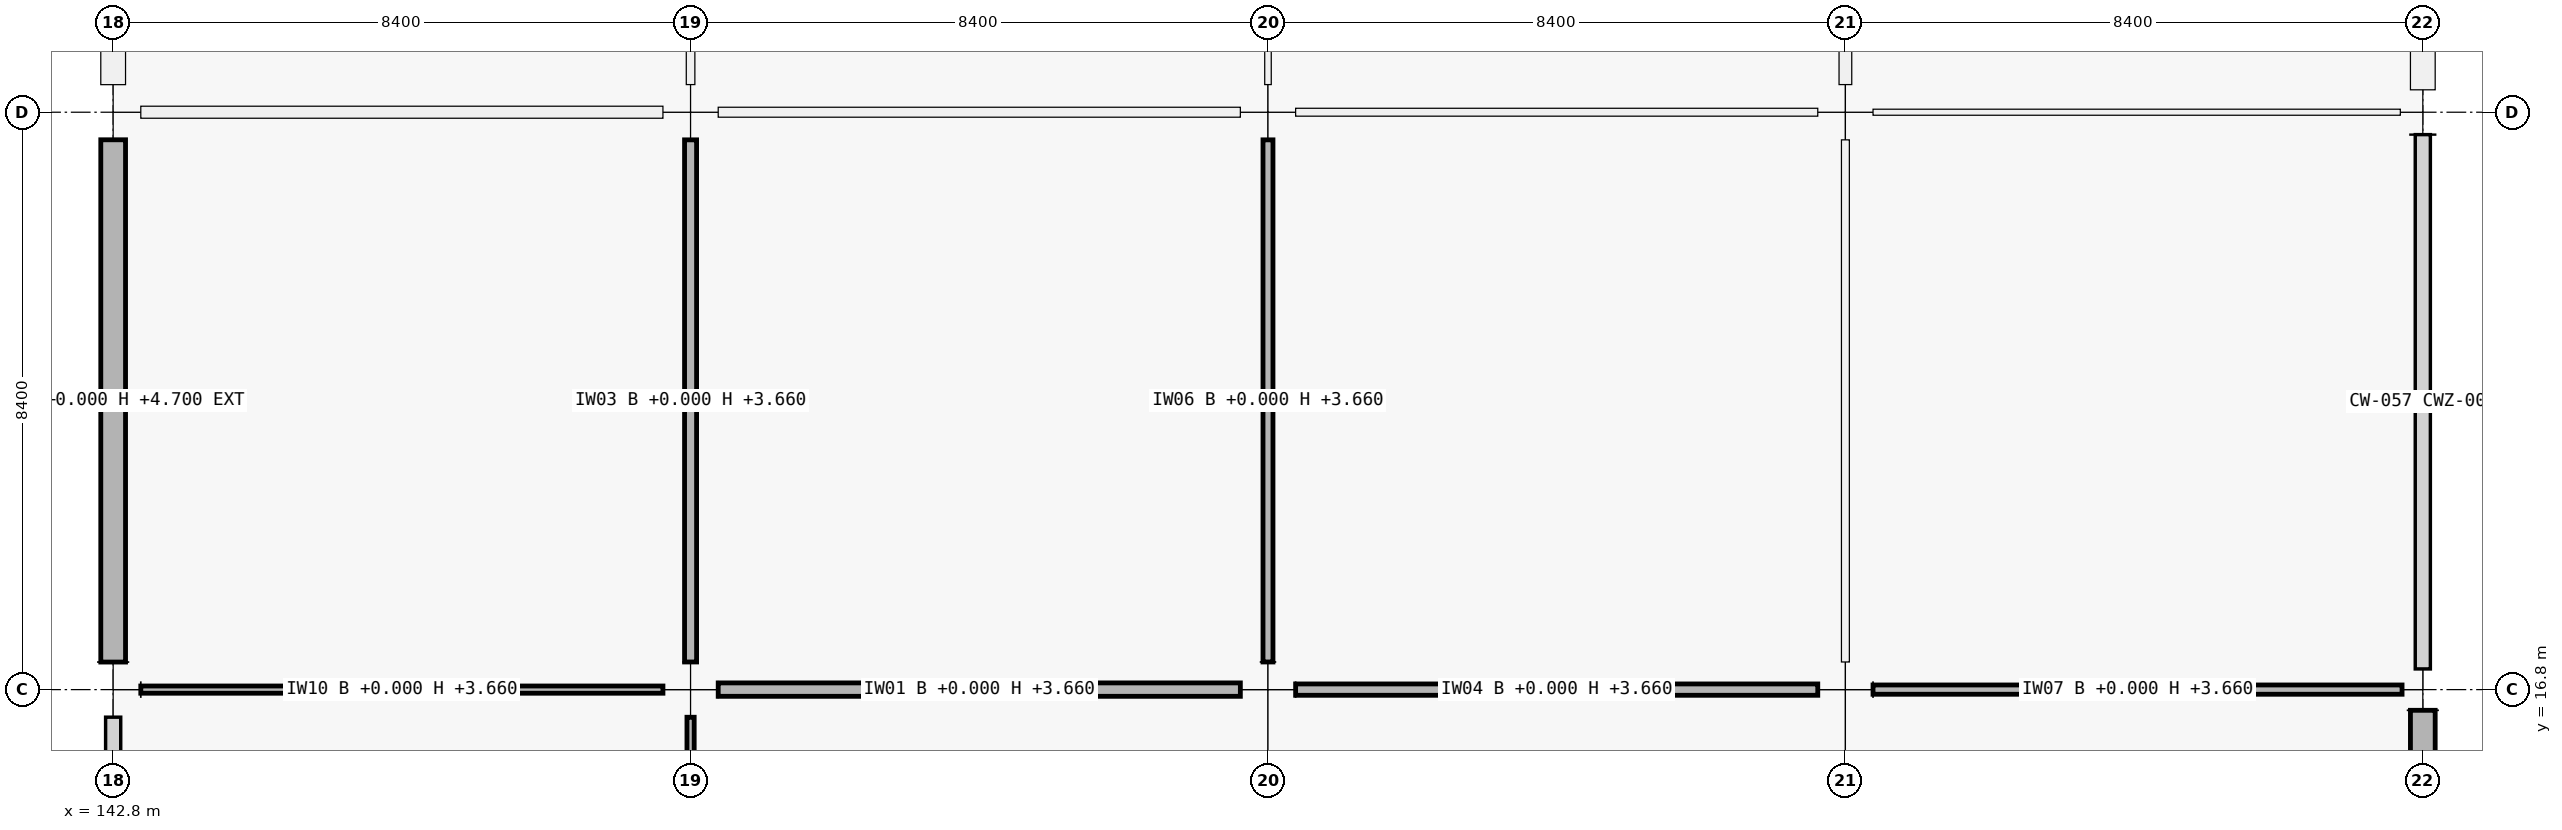
"""IFC4 building model, lengths in metres.
Left out: names, types, materials, properties, quantities, classifications, styles, units other than length and angle.
Written with IfcOpenShell. Run it as: python <this file> out.ifc"""

import sys

from ifc_helpers import new_model, si_unit, direction, frame, frame_2d, origin, origin_2d, place, context, subcontext, project, spatial, rectangle, extrude, element, fill, save


model = new_model("IFC4")
c1 = context("Model", 3, precision=1e-05, world=origin(), true_north=direction((0.0, 1.0)))
c2 = subcontext(c1, "Body", "Model", "MODEL_VIEW")
j1 = project(units=[si_unit("LENGTHUNIT", "METRE"), si_unit("PLANEANGLEUNIT", "RADIAN")], contexts=[c1])
p1 = place(None, origin())
s1 = spatial("IfcSite", under=j1, at=p1, CompositionType="ELEMENT")
p2 = place(p1, origin())
s2 = spatial("IfcBuilding", under=s1, at=p2, CompositionType="ELEMENT")
p3 = place(p2, origin())
s3 = spatial("IfcBuildingStorey", under=s2, at=p3, CompositionType="ELEMENT", Elevation=0.0)
for number, where, z_axis, x_axis in (
    (1, (142.8, 16.8, 0.0), (0.0, 0.0, 1.0), (1.0, 0.0, 0.0)),
    (2, (142.8, 25.2, 0.0), (0.0, 0.0, 1.0), (1.0, 0.0, 0.0)),
    (3, (151.2, 16.8, 0.0), (0.0, 0.0, 1.0), (1.0, 0.0, 0.0)),
    (4, (151.2, 25.2, 0.0), (0.0, 0.0, 1.0), (1.0, 0.0, 0.0)),
    (5, (159.6, 16.8, 0.0), (0.0, 0.0, 1.0), (1.0, 0.0, 0.0)),
    (6, (159.6, 25.2, 0.0), (0.0, 0.0, 1.0), (1.0, 0.0, 0.0)),
    (7, (168.0, 16.8, 0.0), (0.0, 0.0, 1.0), (1.0, 0.0, 0.0)),
    (8, (168.0, 25.2, 0.0), (0.0, 0.0, 1.0), (1.0, 0.0, 0.0)),
):
    element("IfcColumn", number, at=place(p3, frame(where, z_axis=z_axis, x_axis=x_axis)), inside=s3, PredefinedType="COLUMN", context=c2, shape_type="SweptSolid", body=[
        extrude(rectangle(XDim=0.8, YDim=0.8, at=origin_2d()), origin(), (0.0, 0.0, 1.0), 5.76),
    ])
p4 = place(p3, frame((176.4, 16.8, 0.0), z_axis=(0.0, 0.0, 1.0), x_axis=(1.0, 0.0, 0.0)))
e9 = element("IfcColumn", 9, at=p4, inside=s3, PredefinedType="COLUMN", context=c2, shape_type="SweptSolid", body=[
    extrude(rectangle(XDim=0.6, YDim=0.6, at=origin_2d()), origin(), (0.0, 0.0, 1.0), 5.76),
])
p5 = place(p3, frame((176.4, 25.2, 0.0), z_axis=(0.0, 0.0, 1.0), x_axis=(1.0, 0.0, 0.0)))
e10 = element("IfcColumn", 10, at=p5, inside=s3, PredefinedType="COLUMN", context=c2, shape_type="SweptSolid", body=[
    extrude(rectangle(XDim=0.65, YDim=0.65, at=origin_2d()), origin(), (0.0, 0.0, 1.0), 5.76),
])
p6 = place(p3, frame((142.8, 17.201, 0.0), z_axis=(0.0, 0.0, 1.0), x_axis=(0.0, 1.0, 0.0)))
e11 = element("IfcWall", 11, at=p6, inside=s3, PredefinedType="SOLIDWALL", context=c2, shape_type="SweptSolid", body=[
    extrude(rectangle(XDim=7.598, YDim=0.36, at=frame_2d((3.799, 0.0))), origin(), (0.0, 0.0, 1.0), 4.7),
])
p7 = place(p6, frame((3.024, 0.0, 0.9)))
e12 = element("IfcOpeningElement", 12, at=p7, cuts=e11, PredefinedType="OPENING", context=c2, shape_type="SweptSolid", body=[
    extrude(rectangle(XDim=1.55, YDim=1.6, at=frame_2d((0.775, 0.8))), frame((0.0, 0.18, 0.0), z_axis=(0.0, -1.0, 0.0), x_axis=(1.0, 0.0, 0.0)), (0.0, 0.0, 1.0), 0.36),
])
p8 = place(p3, frame((142.8, 25.601, 0.0), z_axis=(0.0, 0.0, 1.0), x_axis=(0.0, 1.0, 0.0)))
e13 = element("IfcWall", 13, at=p8, inside=s3, PredefinedType="SOLIDWALL", context=c2, shape_type="SweptSolid", body=[
    extrude(rectangle(XDim=7.598, YDim=0.36, at=frame_2d((3.799, 0.0))), origin(), (0.0, 0.0, 1.0), 4.7),
])
p9 = place(p8, frame((2.774, 0.0, 0.9)))
e14 = element("IfcOpeningElement", 14, at=p9, cuts=e13, PredefinedType="OPENING", context=c2, shape_type="SweptSolid", body=[
    extrude(rectangle(XDim=2.05, YDim=1.45, at=frame_2d((1.025, 0.725))), frame((0.0, 0.18, 0.0), z_axis=(0.0, -1.0, 0.0), x_axis=(1.0, 0.0, 0.0)), (0.0, 0.0, 1.0), 0.36),
])
p10 = place(p3, frame((176.4, 16.499, 0.0), z_axis=(0.0, 0.0, 1.0), x_axis=(0.0, -1.0, 0.0)))
e15 = element("IfcWall", 15, at=p10, inside=s3, PredefinedType="SOLIDWALL", context=c2, shape_type="SweptSolid", body=[
    extrude(rectangle(XDim=7.773, YDim=0.36, at=frame_2d((3.886, 0.0))), origin(), (0.0, 0.0, 1.0), 4.7),
])
p11 = place(p10, frame((2.886, 0.0, 0.9)))
e16 = element("IfcOpeningElement", 16, at=p11, cuts=e15, PredefinedType="OPENING", context=c2, shape_type="SweptSolid", body=[
    extrude(rectangle(XDim=2.0, YDim=2.1, at=frame_2d((1.0, 1.05))), frame((0.0, 0.18, 0.0), z_axis=(0.0, -1.0, 0.0), x_axis=(1.0, 0.0, 0.0)), (0.0, 0.0, 1.0), 0.36),
])
p12 = place(p3, frame((176.4, 33.299, 0.0), z_axis=(0.0, 0.0, 1.0), x_axis=(0.0, -1.0, 0.0)))
e17 = element("IfcWall", 17, at=p12, inside=s3, PredefinedType="SOLIDWALL", context=c2, shape_type="SweptSolid", body=[
    extrude(rectangle(XDim=7.773, YDim=0.36, at=frame_2d((3.887, 0.0))), origin(), (0.0, 0.0, 1.0), 4.7),
])
p13 = place(p12, frame((2.837, 0.0, 0.0)))
e18 = element("IfcOpeningElement", 18, at=p13, cuts=e17, PredefinedType="OPENING", context=c2, shape_type="SweptSolid", body=[
    extrude(rectangle(XDim=2.1, YDim=2.25, at=frame_2d((1.05, 1.125))), frame((0.0, 0.18, 0.0), z_axis=(0.0, -1.0, 0.0), x_axis=(1.0, 0.0, 0.0)), (0.0, 0.0, 1.0), 0.36),
])
p14 = place(p3, frame((143.202, 16.8, 0.0), z_axis=(0.0, 0.0, 1.0), x_axis=(1.0, 0.0, 0.0)))
e19 = element("IfcWall", 19, at=p14, inside=s3, PredefinedType="PARTITIONING", context=c2, shape_type="SweptSolid", body=[
    extrude(rectangle(XDim=7.596, YDim=0.105, at=frame_2d((3.798, 0.0))), origin(), (0.0, 0.0, 1.0), 3.66),
])
p15 = place(p14, frame((3.313, 0.0, 0.0)))
e20 = element("IfcOpeningElement", 20, at=p15, cuts=e19, PredefinedType="OPENING", context=c2, shape_type="SweptSolid", body=[
    extrude(rectangle(XDim=0.97, YDim=2.12, at=frame_2d((0.485, 1.06))), frame((0.0, 0.052, 0.0), z_axis=(0.0, -1.0, 0.0), x_axis=(1.0, 0.0, 0.0)), (0.0, 0.0, 1.0), 0.105),
])
p16 = place(p3, frame((143.202, 25.2, 0.0), z_axis=(0.0, 0.0, 1.0), x_axis=(1.0, 0.0, 0.0)))
e21 = element("IfcWall", 21, at=p16, inside=s3, PredefinedType="PARTITIONING", context=c2, shape_type="SweptSolid", body=[
    extrude(rectangle(XDim=7.596, YDim=0.175, at=frame_2d((3.798, 0.0))), origin(), (0.0, 0.0, 1.0), 3.66),
])
p17 = place(p16, frame((3.333, 0.0, 0.0)))
e22 = element("IfcOpeningElement", 22, at=p17, cuts=e21, PredefinedType="OPENING", context=c2, shape_type="SweptSolid", body=[
    extrude(rectangle(XDim=0.93, YDim=2.12, at=frame_2d((0.465, 1.06))), frame((0.0, 0.087, 0.0), z_axis=(0.0, -1.0, 0.0), x_axis=(1.0, 0.0, 0.0)), (0.0, 0.0, 1.0), 0.175),
])
p18 = place(p3, frame((151.602, 16.8, 0.0), z_axis=(0.0, 0.0, 1.0), x_axis=(1.0, 0.0, 0.0)))
e23 = element("IfcWall", 23, at=p18, inside=s3, PredefinedType="PARTITIONING", context=c2, shape_type="SweptSolid", body=[
    extrude(rectangle(XDim=7.596, YDim=0.195, at=frame_2d((3.798, 0.0))), origin(), (0.0, 0.0, 1.0), 3.66),
])
p19 = place(p18, frame((3.288, 0.0, 0.0)))
e24 = element("IfcOpeningElement", 24, at=p19, cuts=e23, PredefinedType="OPENING", context=c2, shape_type="SweptSolid", body=[
    extrude(rectangle(XDim=1.02, YDim=2.2, at=frame_2d((0.51, 1.1))), frame((0.0, 0.098, 0.0), z_axis=(0.0, -1.0, 0.0), x_axis=(1.0, 0.0, 0.0)), (0.0, 0.0, 1.0), 0.195),
])
p20 = place(p3, frame((151.602, 25.2, 0.0), z_axis=(0.0, 0.0, 1.0), x_axis=(1.0, 0.0, 0.0)))
e25 = element("IfcWall", 25, at=p20, inside=s3, PredefinedType="PARTITIONING", context=c2, shape_type="SweptSolid", body=[
    extrude(rectangle(XDim=7.596, YDim=0.145, at=frame_2d((3.798, 0.0))), origin(), (0.0, 0.0, 1.0), 3.66),
])
p21 = place(p20, frame((3.278, 0.0, 0.0)))
e26 = element("IfcOpeningElement", 26, at=p21, cuts=e25, PredefinedType="OPENING", context=c2, shape_type="SweptSolid", body=[
    extrude(rectangle(XDim=1.04, YDim=2.2, at=frame_2d((0.52, 1.1))), frame((0.0, 0.073, 0.0), z_axis=(0.0, -1.0, 0.0), x_axis=(1.0, 0.0, 0.0)), (0.0, 0.0, 1.0), 0.145),
])
p22 = place(p3, frame((160.002, 16.8, 0.0), z_axis=(0.0, 0.0, 1.0), x_axis=(1.0, 0.0, 0.0)))
e27 = element("IfcWall", 27, at=p22, inside=s3, PredefinedType="PARTITIONING", context=c2, shape_type="SweptSolid", body=[
    extrude(rectangle(XDim=7.596, YDim=0.165, at=frame_2d((3.798, 0.0))), origin(), (0.0, 0.0, 1.0), 3.66),
])
p23 = place(p22, frame((3.338, 0.0, 0.0)))
e28 = element("IfcOpeningElement", 28, at=p23, cuts=e27, PredefinedType="OPENING", context=c2, shape_type="SweptSolid", body=[
    extrude(rectangle(XDim=0.92, YDim=2.15, at=frame_2d((0.46, 1.075))), frame((0.0, 0.083, 0.0), z_axis=(0.0, -1.0, 0.0), x_axis=(1.0, 0.0, 0.0)), (0.0, 0.0, 1.0), 0.165),
])
p24 = place(p3, frame((160.002, 25.2, 0.0), z_axis=(0.0, 0.0, 1.0), x_axis=(1.0, 0.0, 0.0)))
e29 = element("IfcWall", 29, at=p24, inside=s3, PredefinedType="PARTITIONING", context=c2, shape_type="SweptSolid", body=[
    extrude(rectangle(XDim=7.596, YDim=0.115, at=frame_2d((3.798, 0.0))), origin(), (0.0, 0.0, 1.0), 3.66),
])
p25 = place(p24, frame((3.268, 0.0, 0.0)))
e30 = element("IfcOpeningElement", 30, at=p25, cuts=e29, PredefinedType="OPENING", context=c2, shape_type="SweptSolid", body=[
    extrude(rectangle(XDim=1.06, YDim=2.25, at=frame_2d((0.53, 1.125))), frame((0.0, 0.058, 0.0), z_axis=(0.0, -1.0, 0.0), x_axis=(1.0, 0.0, 0.0)), (0.0, 0.0, 1.0), 0.115),
])
p26 = place(p3, frame((168.402, 16.8, 0.0), z_axis=(0.0, 0.0, 1.0), x_axis=(1.0, 0.0, 0.0)))
e31 = element("IfcWall", 31, at=p26, inside=s3, PredefinedType="PARTITIONING", context=c2, shape_type="SweptSolid", body=[
    extrude(rectangle(XDim=7.696, YDim=0.135, at=frame_2d((3.848, 0.0))), origin(), (0.0, 0.0, 1.0), 3.66),
])
p27 = place(p26, frame((3.363, 0.0, 0.0)))
e32 = element("IfcOpeningElement", 32, at=p27, cuts=e31, PredefinedType="OPENING", context=c2, shape_type="SweptSolid", body=[
    extrude(rectangle(XDim=0.97, YDim=2.12, at=frame_2d((0.485, 1.06))), frame((0.0, 0.067, 0.0), z_axis=(0.0, -1.0, 0.0), x_axis=(1.0, 0.0, 0.0)), (0.0, 0.0, 1.0), 0.135),
])
p28 = place(p3, frame((168.402, 25.2, 0.0), z_axis=(0.0, 0.0, 1.0), x_axis=(1.0, 0.0, 0.0)))
e33 = element("IfcWall", 33, at=p28, inside=s3, PredefinedType="PARTITIONING", context=c2, shape_type="SweptSolid", body=[
    extrude(rectangle(XDim=7.671, YDim=0.088, at=frame_2d((3.835, 0.0))), origin(), (0.0, 0.0, 1.0), 3.66),
])
p29 = place(p28, frame((3.336, 0.0, 0.0)))
e34 = element("IfcOpeningElement", 34, at=p29, cuts=e33, PredefinedType="OPENING", context=c2, shape_type="SweptSolid", body=[
    extrude(rectangle(XDim=1.0, YDim=2.2, at=frame_2d((0.5, 1.1))), frame((0.0, 0.044, 0.0), z_axis=(0.0, -1.0, 0.0), x_axis=(1.0, 0.0, 0.0)), (0.0, 0.0, 1.0), 0.088),
])
p30 = place(p3, frame((151.2, 8.752, 0.0), z_axis=(0.0, 0.0, 1.0), x_axis=(0.0, 1.0, 0.0)))
e35 = element("IfcWall", 35, at=p30, inside=s3, PredefinedType="PARTITIONING", context=c2, shape_type="SweptSolid", body=[
    extrude(rectangle(XDim=7.646, YDim=0.105, at=frame_2d((3.823, 0.0))), origin(), (0.0, 0.0, 1.0), 3.66),
])
p31 = place(p30, frame((3.358, 0.0, 0.0)))
e36 = element("IfcOpeningElement", 36, at=p31, cuts=e35, PredefinedType="OPENING", context=c2, shape_type="SweptSolid", body=[
    extrude(rectangle(XDim=0.93, YDim=2.12, at=frame_2d((0.465, 1.06))), frame((0.0, 0.052, 0.0), z_axis=(0.0, -1.0, 0.0), x_axis=(1.0, 0.0, 0.0)), (0.0, 0.0, 1.0), 0.105),
])
p32 = place(p3, frame((151.2, 17.202, 0.0), z_axis=(0.0, 0.0, 1.0), x_axis=(0.0, 1.0, 0.0)))
e37 = element("IfcWall", 37, at=p32, inside=s3, PredefinedType="PARTITIONING", context=c2, shape_type="SweptSolid", body=[
    extrude(rectangle(XDim=7.596, YDim=0.175, at=frame_2d((3.798, 0.0))), origin(), (0.0, 0.0, 1.0), 3.66),
])
p33 = place(p32, frame((3.278, 0.0, 0.0)))
e38 = element("IfcOpeningElement", 38, at=p33, cuts=e37, PredefinedType="OPENING", context=c2, shape_type="SweptSolid", body=[
    extrude(rectangle(XDim=1.04, YDim=2.2, at=frame_2d((0.52, 1.1))), frame((0.0, 0.087, 0.0), z_axis=(0.0, -1.0, 0.0), x_axis=(1.0, 0.0, 0.0)), (0.0, 0.0, 1.0), 0.175),
])
p34 = place(p3, frame((151.2, 25.602, 0.0), z_axis=(0.0, 0.0, 1.0), x_axis=(0.0, 1.0, 0.0)))
e39 = element("IfcWall", 39, at=p34, inside=s3, PredefinedType="PARTITIONING", context=c2, shape_type="SweptSolid", body=[
    extrude(rectangle(XDim=7.621, YDim=0.125, at=frame_2d((3.811, 0.0))), origin(), (0.0, 0.0, 1.0), 3.66),
])
p35 = place(p34, frame((3.301, 0.0, 0.0)))
e40 = element("IfcOpeningElement", 40, at=p35, cuts=e39, PredefinedType="OPENING", context=c2, shape_type="SweptSolid", body=[
    extrude(rectangle(XDim=1.02, YDim=2.2, at=frame_2d((0.51, 1.1))), frame((0.0, 0.062, 0.0), z_axis=(0.0, -1.0, 0.0), x_axis=(1.0, 0.0, 0.0)), (0.0, 0.0, 1.0), 0.125),
])
p36 = place(p3, frame((159.6, 17.202, 0.0), z_axis=(0.0, 0.0, 1.0), x_axis=(0.0, 1.0, 0.0)))
e41 = element("IfcWall", 41, at=p36, inside=s3, PredefinedType="PARTITIONING", context=c2, shape_type="SweptSolid", body=[
    extrude(rectangle(XDim=7.596, YDim=0.145, at=frame_2d((3.798, 0.0))), origin(), (0.0, 0.0, 1.0), 3.66),
])
p37 = place(p36, frame((3.273, 0.0, 0.0)))
e42 = element("IfcOpeningElement", 42, at=p37, cuts=e41, PredefinedType="OPENING", context=c2, shape_type="SweptSolid", body=[
    extrude(rectangle(XDim=1.05, YDim=2.12, at=frame_2d((0.525, 1.06))), frame((0.0, 0.073, 0.0), z_axis=(0.0, -1.0, 0.0), x_axis=(1.0, 0.0, 0.0)), (0.0, 0.0, 1.0), 0.145),
])
p38 = place(p3, frame((159.6, 25.602, 0.0), z_axis=(0.0, 0.0, 1.0), x_axis=(0.0, 1.0, 0.0)))
e43 = element("IfcWall", 43, at=p38, inside=s3, PredefinedType="PARTITIONING", context=c2, shape_type="SweptSolid", body=[
    extrude(rectangle(XDim=7.596, YDim=0.095, at=frame_2d((3.798, 0.0))), origin(), (0.0, 0.0, 1.0), 3.66),
])
p39 = place(p38, frame((3.328, 0.0, 0.0)))
e44 = element("IfcOpeningElement", 44, at=p39, cuts=e43, PredefinedType="OPENING", context=c2, shape_type="SweptSolid", body=[
    extrude(rectangle(XDim=0.94, YDim=2.15, at=frame_2d((0.47, 1.075))), frame((0.0, 0.047, 0.0), z_axis=(0.0, -1.0, 0.0), x_axis=(1.0, 0.0, 0.0)), (0.0, 0.0, 1.0), 0.095),
])
p40 = place(p3, frame((168.0, 17.202, 0.0), z_axis=(0.0, 0.0, 1.0), x_axis=(0.0, 1.0, 0.0)))
e45 = element("IfcWall", 45, at=p40, inside=s3, PredefinedType="PARTITIONING", context=c2, shape_type="SweptSolid", body=[
    extrude(rectangle(XDim=7.596, YDim=0.115, at=frame_2d((3.798, 0.0))), origin(), (0.0, 0.0, 1.0), 3.66),
])
p41 = place(p40, frame((3.333, 0.0, 0.0)))
e46 = element("IfcOpeningElement", 46, at=p41, cuts=e45, PredefinedType="OPENING", context=c2, shape_type="SweptSolid", body=[
    extrude(rectangle(XDim=0.93, YDim=2.12, at=frame_2d((0.465, 1.06))), frame((0.0, 0.058, 0.0), z_axis=(0.0, -1.0, 0.0), x_axis=(1.0, 0.0, 0.0)), (0.0, 0.0, 1.0), 0.115),
])
p42 = place(p3, frame((168.0, 25.602, 0.0), z_axis=(0.0, 0.0, 1.0), x_axis=(0.0, 1.0, 0.0)))
e47 = element("IfcWall", 47, at=p42, inside=s3, PredefinedType="PARTITIONING", context=c2, shape_type="SweptSolid", body=[
    extrude(rectangle(XDim=7.596, YDim=0.185, at=frame_2d((3.798, 0.0))), origin(), (0.0, 0.0, 1.0), 3.66),
])
p43 = place(p42, frame((3.293, 0.0, 0.0)))
e48 = element("IfcOpeningElement", 48, at=p43, cuts=e47, PredefinedType="OPENING", context=c2, shape_type="SweptSolid", body=[
    extrude(rectangle(XDim=1.01, YDim=2.12, at=frame_2d((0.505, 1.06))), frame((0.0, 0.093, 0.0), z_axis=(0.0, -1.0, 0.0), x_axis=(1.0, 0.0, 0.0)), (0.0, 0.0, 1.0), 0.185),
])
p44 = place(p7, origin())
e49 = element("IfcWindow", 49, at=p44, inside=s3, PartitioningType="SINGLE_PANEL", PredefinedType="WINDOW", context=c2, shape_type="SweptSolid", body=[
    extrude(rectangle(XDim=1.55, YDim=1.6, at=frame_2d((0.775, 0.8))), frame((0.0, 0.03, 0.0), z_axis=(0.0, -1.0, 0.0), x_axis=(1.0, 0.0, 0.0)), (0.0, 0.0, 1.0), 0.06),
])
fill(e12, e49)
p45 = place(p25, origin())
e50 = element("IfcDoor", 50, at=p45, inside=s3, OperationType="SINGLE_SWING_LEFT", PredefinedType="DOOR", context=c2, shape_type="SweptSolid", body=[
    extrude(rectangle(XDim=1.06, YDim=2.25, at=frame_2d((0.53, 1.125))), frame((0.0, 0.025, 0.0), z_axis=(0.0, -1.0, 0.0), x_axis=(1.0, 0.0, 0.0)), (0.0, 0.0, 1.0), 0.05),
])
fill(e30, e50)
p46 = place(p15, origin())
e51 = element("IfcDoor", 51, at=p46, inside=s3, OperationType="SINGLE_SWING_LEFT", PredefinedType="DOOR", context=c2, shape_type="SweptSolid", body=[
    extrude(rectangle(XDim=0.97, YDim=2.12, at=frame_2d((0.485, 1.06))), frame((0.0, 0.025, 0.0), z_axis=(0.0, -1.0, 0.0), x_axis=(1.0, 0.0, 0.0)), (0.0, 0.0, 1.0), 0.05),
])
fill(e20, e51)
p47 = place(p17, origin())
e52 = element("IfcDoor", 52, at=p47, inside=s3, OperationType="SINGLE_SWING_RIGHT", PredefinedType="DOOR", context=c2, shape_type="SweptSolid", body=[
    extrude(rectangle(XDim=0.93, YDim=2.12, at=frame_2d((0.465, 1.06))), frame((0.0, 0.025, 0.0), z_axis=(0.0, -1.0, 0.0), x_axis=(1.0, 0.0, 0.0)), (0.0, 0.0, 1.0), 0.05),
])
fill(e22, e52)
p48 = place(p19, origin())
e53 = element("IfcDoor", 53, at=p48, inside=s3, OperationType="SINGLE_SWING_RIGHT", PredefinedType="DOOR", context=c2, shape_type="SweptSolid", body=[
    extrude(rectangle(XDim=1.02, YDim=2.2, at=frame_2d((0.51, 1.1))), frame((0.0, 0.025, 0.0), z_axis=(0.0, -1.0, 0.0), x_axis=(1.0, 0.0, 0.0)), (0.0, 0.0, 1.0), 0.05),
])
fill(e24, e53)
p49 = place(p23, origin())
e54 = element("IfcDoor", 54, at=p49, inside=s3, OperationType="SINGLE_SWING_LEFT", PredefinedType="DOOR", context=c2, shape_type="SweptSolid", body=[
    extrude(rectangle(XDim=0.92, YDim=2.15, at=frame_2d((0.46, 1.075))), frame((0.0, 0.025, 0.0), z_axis=(0.0, -1.0, 0.0), x_axis=(1.0, 0.0, 0.0)), (0.0, 0.0, 1.0), 0.05),
])
fill(e28, e54)
p50 = place(p27, origin())
e55 = element("IfcDoor", 55, at=p50, inside=s3, OperationType="SINGLE_SWING_RIGHT", PredefinedType="DOOR", context=c2, shape_type="SweptSolid", body=[
    extrude(rectangle(XDim=0.97, YDim=2.12, at=frame_2d((0.485, 1.06))), frame((0.0, 0.025, 0.0), z_axis=(0.0, -1.0, 0.0), x_axis=(1.0, 0.0, 0.0)), (0.0, 0.0, 1.0), 0.05),
])
fill(e32, e55)
p51 = place(p21, origin())
e56 = element("IfcDoor", 56, at=p51, inside=s3, OperationType="SINGLE_SWING_LEFT", PredefinedType="DOOR", context=c2, shape_type="SweptSolid", body=[
    extrude(rectangle(XDim=1.04, YDim=2.2, at=frame_2d((0.52, 1.1))), frame((0.0, 0.025, 0.0), z_axis=(0.0, -1.0, 0.0), x_axis=(1.0, 0.0, 0.0)), (0.0, 0.0, 1.0), 0.05),
])
fill(e26, e56)
p52 = place(p29, origin())
e57 = element("IfcDoor", 57, at=p52, inside=s3, OperationType="SINGLE_SWING_LEFT", PredefinedType="DOOR", context=c2, shape_type="SweptSolid", body=[
    extrude(rectangle(XDim=1.0, YDim=2.2, at=frame_2d((0.5, 1.1))), frame((0.0, 0.025, 0.0), z_axis=(0.0, -1.0, 0.0), x_axis=(1.0, 0.0, 0.0)), (0.0, 0.0, 1.0), 0.05),
])
fill(e34, e57)
p53 = place(p33, origin())
e58 = element("IfcDoor", 58, at=p53, inside=s3, OperationType="SINGLE_SWING_RIGHT", PredefinedType="DOOR", context=c2, shape_type="SweptSolid", body=[
    extrude(rectangle(XDim=1.04, YDim=2.2, at=frame_2d((0.52, 1.1))), frame((0.0, 0.025, 0.0), z_axis=(0.0, -1.0, 0.0), x_axis=(1.0, 0.0, 0.0)), (0.0, 0.0, 1.0), 0.05),
])
fill(e38, e58)
p54 = place(p37, origin())
e59 = element("IfcDoor", 59, at=p54, inside=s3, OperationType="SINGLE_SWING_LEFT", PredefinedType="DOOR", context=c2, shape_type="SweptSolid", body=[
    extrude(rectangle(XDim=1.05, YDim=2.12, at=frame_2d((0.525, 1.06))), frame((0.0, 0.025, 0.0), z_axis=(0.0, -1.0, 0.0), x_axis=(1.0, 0.0, 0.0)), (0.0, 0.0, 1.0), 0.05),
])
fill(e42, e59)
p55 = place(p41, origin())
e60 = element("IfcDoor", 60, at=p55, inside=s3, OperationType="SINGLE_SWING_RIGHT", PredefinedType="DOOR", context=c2, shape_type="SweptSolid", body=[
    extrude(rectangle(XDim=0.93, YDim=2.12, at=frame_2d((0.465, 1.06))), frame((0.0, 0.025, 0.0), z_axis=(0.0, -1.0, 0.0), x_axis=(1.0, 0.0, 0.0)), (0.0, 0.0, 1.0), 0.05),
])
fill(e46, e60)
save(model, sys.argv[1])
